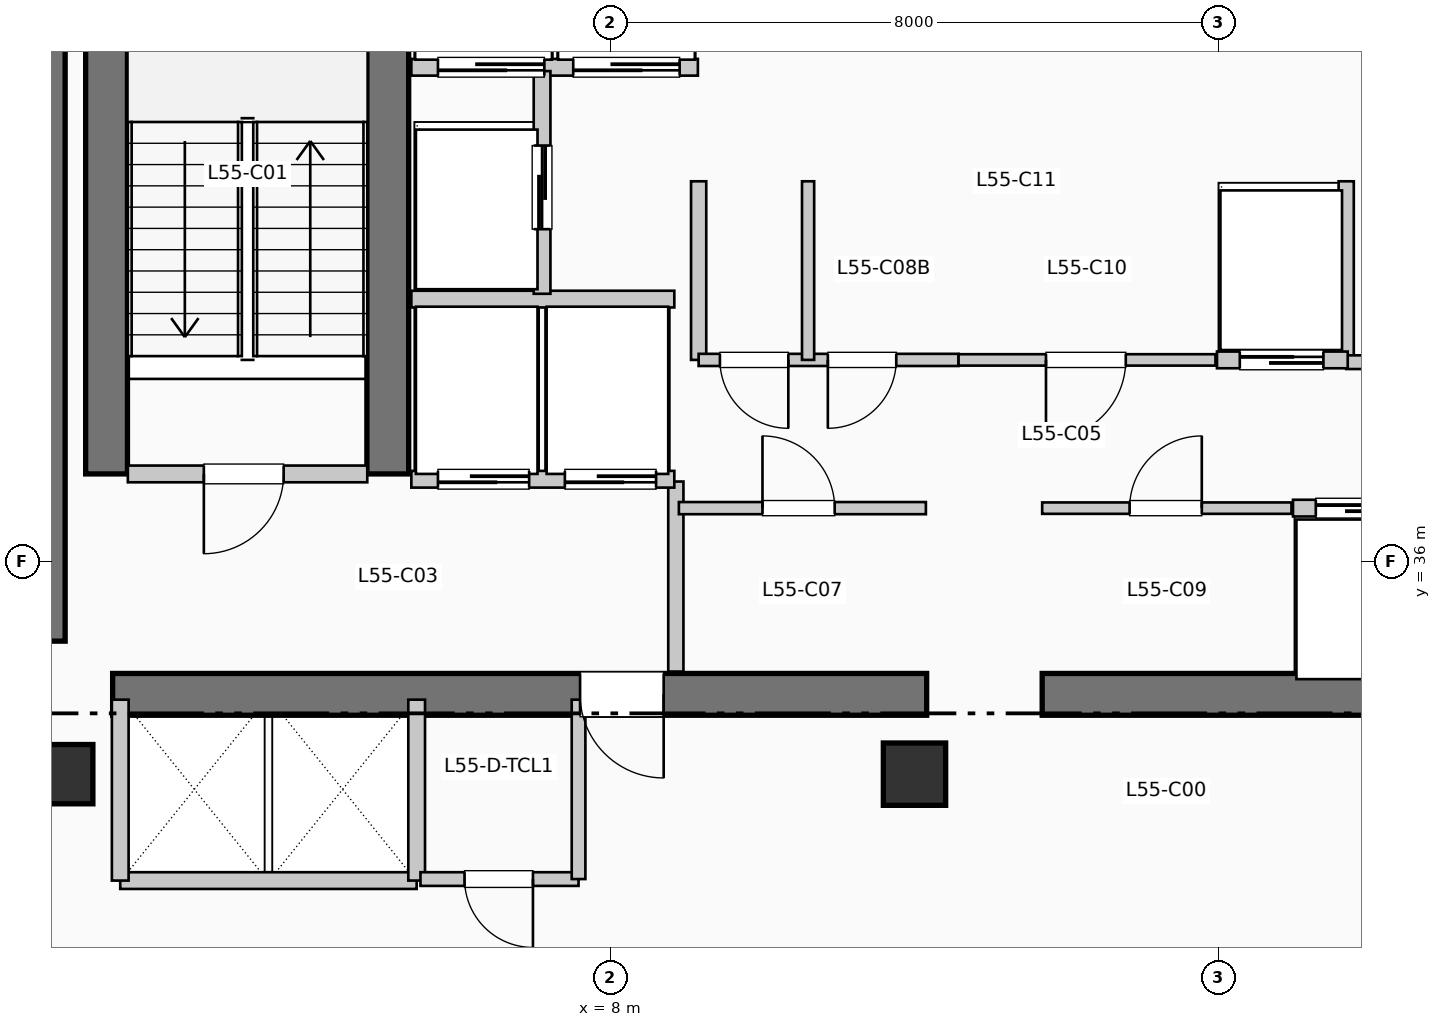
"""IFC4 building model, lengths in metres.
Left out: names, types, materials, properties, quantities, classifications, styles, units other than length and angle.
Written with IfcOpenShell. Run it as: python <this file> out.ifc"""

import sys

from ifc_helpers import new_model, si_unit, direction, frame, frame_2d, origin, origin_2d, place, context, subcontext, project, spatial, rectangle, extrude, element, fill, save


model = new_model("IFC4")
c1 = context("Model", 3, precision=1e-05, world=origin(), true_north=direction((0.0, 1.0)))
c2 = subcontext(c1, "Body", "Model", "MODEL_VIEW")
j1 = project(units=[si_unit("LENGTHUNIT", "METRE"), si_unit("PLANEANGLEUNIT", "RADIAN")], contexts=[c1])
p1 = place(None, origin())
s1 = spatial("IfcSite", under=j1, at=p1, CompositionType="ELEMENT")
p2 = place(p1, origin())
s2 = spatial("IfcBuilding", under=s1, at=p2, CompositionType="ELEMENT")
p3 = place(p2, frame((0.0, 0.0, 227.7)))
s3 = spatial("IfcBuildingStorey", under=s2, at=p3, CompositionType="ELEMENT", Elevation=227.7)
p4 = place(p3, frame((0.5, 34.95, 0.0), z_axis=(0.0, 0.0, 1.0), x_axis=(0.0, 1.0, 0.0)))
e1 = element("IfcWall", 1, at=p4, inside=s3, PredefinedType="SHEAR", context=c2, shape_type="SweptSolid", body=[
    extrude(rectangle(XDim=7.9, YDim=0.65, at=frame_2d((3.95, 0.0))), origin(), (0.0, 0.0, 1.0), 3.96),
])
p5 = place(p3, frame((1.45, 34.25, 0.0), z_axis=(0.0, 0.0, 1.0), x_axis=(1.0, 0.0, 0.0)))
e2 = element("IfcWall", 2, at=p5, inside=s3, PredefinedType="SHEAR", context=c2, shape_type="SweptSolid", body=[
    extrude(rectangle(XDim=10.71, YDim=0.55, at=frame_2d((5.355, 0.0))), origin(), (0.0, 0.0, 1.0), 3.96),
])
p6 = place(p5, frame((7.25, 0.0, 0.0), z_axis=(0.0, 0.0, 1.0), x_axis=(-1.0, 0.0, 0.0)))
e3 = element("IfcOpeningElement", 3, at=p6, cuts=e2, PredefinedType="OPENING", context=c2, shape_type="SweptSolid", body=[
    extrude(rectangle(XDim=1.1, YDim=2.15, at=frame_2d((0.55, 1.075))), frame((0.0, 0.285, 0.0), z_axis=(0.0, -1.0, 0.0), x_axis=(1.0, 0.0, 0.0)), (0.0, 0.0, 1.0), 0.57),
])
p7 = place(p3, frame((13.68, 34.25, 0.0), z_axis=(0.0, 0.0, 1.0), x_axis=(1.0, 0.0, 0.0)))
e4 = element("IfcWall", 4, at=p7, inside=s3, PredefinedType="SHEAR", context=c2, shape_type="SweptSolid", body=[
    extrude(rectangle(XDim=6.12, YDim=0.55, at=frame_2d((3.06, 0.0))), origin(), (0.0, 0.0, 1.0), 3.96),
])
for number, where, z_axis, x_axis in (
    (5, (1.37, 37.15, 0.0), (0.0, 0.0, 1.0), (0.0, 1.0, 0.0)),
    (6, (5.07, 37.15, 0.0), (0.0, 0.0, 1.0), (0.0, 1.0, 0.0)),
):
    element("IfcWall", number, at=place(p3, frame(where, z_axis=z_axis, x_axis=x_axis)), inside=s3, PredefinedType="SHEAR", context=c2, shape_type="SweptSolid", body=[
        extrude(rectangle(XDim=7.89, YDim=0.55, at=frame_2d((3.945, 0.0))), origin(), (0.0, 0.0, 1.0), 3.96),
    ])
p8 = place(p3, frame((0.8, 33.2, 0.0), z_axis=(0.0, 0.0, 1.0), x_axis=(1.0, 0.0, 0.0)))
e7 = element("IfcColumn", 7, at=p8, inside=s3, PredefinedType="COLUMN", context=c2, shape_type="SweptSolid", body=[
    extrude(rectangle(XDim=0.78, YDim=0.78, at=origin_2d()), origin(), (0.0, 0.0, 1.0), 3.96),
])
p9 = place(p3, frame((12.0, 33.2, 0.0), z_axis=(0.0, 0.0, 1.0), x_axis=(1.0, 0.0, 0.0)))
e8 = element("IfcColumn", 8, at=p9, inside=s3, PredefinedType="COLUMN", context=c2, shape_type="SweptSolid", body=[
    extrude(rectangle(XDim=0.82, YDim=0.82, at=origin_2d()), origin(), (0.0, 0.0, 1.0), 3.96),
])
p10 = place(p3, frame((1.65, 37.15, 0.0), z_axis=(0.0, 0.0, 1.0), x_axis=(1.0, 0.0, 0.0)))
e9 = element("IfcWall", 9, at=p10, inside=s3, PredefinedType="PARTITIONING", context=c2, shape_type="SweptSolid", body=[
    extrude(rectangle(XDim=3.15, YDim=0.22, at=frame_2d((1.575, 0.0))), origin(), (0.0, 0.0, 1.0), 3.71),
])
p11 = place(p10, frame((2.05, 0.0, 0.0), z_axis=(0.0, 0.0, 1.0), x_axis=(-1.0, 0.0, 0.0)))
e10 = element("IfcOpeningElement", 10, at=p11, cuts=e9, PredefinedType="OPENING", context=c2, shape_type="SweptSolid", body=[
    extrude(rectangle(XDim=1.05, YDim=2.15, at=frame_2d((0.525, 1.075))), frame((0.0, 0.12, 0.0), z_axis=(0.0, -1.0, 0.0), x_axis=(1.0, 0.0, 0.0)), (0.0, 0.0, 1.0), 0.24),
])
p12 = place(p3, frame((8.86, 34.55, 0.0), z_axis=(0.0, 0.0, 1.0), x_axis=(0.0, 1.0, 0.0)))
e11 = element("IfcWall", 11, at=p12, inside=s3, PredefinedType="PARTITIONING", context=c2, shape_type="SweptSolid", body=[
    extrude(rectangle(XDim=2.5, YDim=0.2, at=frame_2d((1.25, 0.0))), origin(), (0.0, 0.0, 1.0), 3.71),
])
p13 = place(p3, frame((5.38, 37.08, 0.0), z_axis=(0.0, 0.0, 1.0), x_axis=(1.0, 0.0, 0.0)))
e12 = element("IfcWall", 12, at=p13, inside=s3, PredefinedType="PARTITIONING", context=c2, shape_type="SweptSolid", body=[
    extrude(rectangle(XDim=3.46, YDim=0.22, at=frame_2d((1.73, 0.0))), origin(), (0.0, 0.0, 1.0), 3.71),
])
p14 = place(p13, frame((1.55, 0.0, 0.0), z_axis=(0.0, 0.0, 1.0), x_axis=(-1.0, 0.0, 0.0)))
e13 = element("IfcOpeningElement", 13, at=p14, cuts=e12, PredefinedType="OPENING", context=c2, shape_type="SweptSolid", body=[
    extrude(rectangle(XDim=1.2, YDim=2.2, at=frame_2d((0.6, 1.1))), frame((0.0, 0.12, 0.0), z_axis=(0.0, -1.0, 0.0), x_axis=(1.0, 0.0, 0.0)), (0.0, 0.0, 1.0), 0.24),
])
p15 = place(p13, frame((3.22, 0.0, 0.0), z_axis=(0.0, 0.0, 1.0), x_axis=(-1.0, 0.0, 0.0)))
e14 = element("IfcOpeningElement", 14, at=p15, cuts=e12, PredefinedType="OPENING", context=c2, shape_type="SweptSolid", body=[
    extrude(rectangle(XDim=1.2, YDim=2.2, at=frame_2d((0.6, 1.1))), frame((0.0, 0.12, 0.0), z_axis=(0.0, -1.0, 0.0), x_axis=(1.0, 0.0, 0.0)), (0.0, 0.0, 1.0), 0.24),
])
p16 = place(p3, frame((5.38, 39.45, 0.0), z_axis=(0.0, 0.0, 1.0), x_axis=(1.0, 0.0, 0.0)))
e15 = element("IfcWall", 15, at=p16, inside=s3, PredefinedType="PARTITIONING", context=c2, shape_type="SweptSolid", body=[
    extrude(rectangle(XDim=3.46, YDim=0.22, at=frame_2d((1.73, 0.0))), origin(), (0.0, 0.0, 1.0), 3.71),
])
p17 = place(p3, frame((5.38, 42.5, 0.0), z_axis=(0.0, 0.0, 1.0), x_axis=(1.0, 0.0, 0.0)))
e16 = element("IfcWall", 16, at=p17, inside=s3, PredefinedType="PARTITIONING", context=c2, shape_type="SweptSolid", body=[
    extrude(rectangle(XDim=3.77, YDim=0.22, at=frame_2d((1.885, 0.0))), origin(), (0.0, 0.0, 1.0), 3.71),
])
p18 = place(p17, frame((1.75, 0.0, 0.0), z_axis=(0.0, 0.0, 1.0), x_axis=(-1.0, 0.0, 0.0)))
e17 = element("IfcOpeningElement", 17, at=p18, cuts=e16, PredefinedType="OPENING", context=c2, shape_type="SweptSolid", body=[
    extrude(rectangle(XDim=1.4, YDim=2.2, at=frame_2d((0.7, 1.1))), frame((0.0, 0.12, 0.0), z_axis=(0.0, -1.0, 0.0), x_axis=(1.0, 0.0, 0.0)), (0.0, 0.0, 1.0), 0.24),
])
p19 = place(p17, frame((3.53, 0.0, 0.0), z_axis=(0.0, 0.0, 1.0), x_axis=(-1.0, 0.0, 0.0)))
e18 = element("IfcOpeningElement", 18, at=p19, cuts=e16, PredefinedType="OPENING", context=c2, shape_type="SweptSolid", body=[
    extrude(rectangle(XDim=1.4, YDim=2.2, at=frame_2d((0.7, 1.1))), frame((0.0, 0.12, 0.0), z_axis=(0.0, -1.0, 0.0), x_axis=(1.0, 0.0, 0.0)), (0.0, 0.0, 1.0), 0.24),
])
p20 = place(p3, frame((7.1, 39.52, 0.0), z_axis=(0.0, 0.0, 1.0), x_axis=(0.0, 1.0, 0.0)))
e19 = element("IfcWall", 19, at=p20, inside=s3, PredefinedType="PARTITIONING", context=c2, shape_type="SweptSolid", body=[
    extrude(rectangle(XDim=2.93, YDim=0.22, at=frame_2d((1.465, 0.0))), origin(), (0.0, 0.0, 1.0), 3.71),
])
p21 = place(p20, frame((0.85, 0.0, 0.0)))
e20 = element("IfcOpeningElement", 20, at=p21, cuts=e19, PredefinedType="OPENING", context=c2, shape_type="SweptSolid", body=[
    extrude(rectangle(XDim=1.1, YDim=2.2, at=frame_2d((0.55, 1.1))), frame((0.0, 0.12, 0.0), z_axis=(0.0, -1.0, 0.0), x_axis=(1.0, 0.0, 0.0)), (0.0, 0.0, 1.0), 0.24),
])
p22 = place(p3, frame((1.55, 31.8, 0.0), z_axis=(0.0, 0.0, 1.0), x_axis=(1.0, 0.0, 0.0)))
e21 = element("IfcWall", 21, at=p22, inside=s3, PredefinedType="PARTITIONING", context=c2, shape_type="SweptSolid", body=[
    extrude(rectangle(XDim=3.9, YDim=0.22, at=frame_2d((1.95, 0.0))), origin(), (0.0, 0.0, 1.0), 3.71),
])
for number, where, z_axis, x_axis in (
    (22, (1.55, 31.8, 0.0), (0.0, 0.0, 1.0), (0.0, 1.0, 0.0)),
    (23, (5.45, 31.8, 0.0), (0.0, 0.0, 1.0), (0.0, 1.0, 0.0)),
):
    element("IfcWall", number, at=place(p3, frame(where, z_axis=z_axis, x_axis=x_axis)), inside=s3, PredefinedType="PARTITIONING", context=c2, shape_type="SweptSolid", body=[
        extrude(rectangle(XDim=2.38, YDim=0.22, at=frame_2d((1.19, 0.0))), origin(), (0.0, 0.0, 1.0), 3.71),
    ])
for number, where, z_axis, x_axis in (
    (24, (9.16, 38.65, 0.0), (0.0, 0.0, 1.0), (0.0, 1.0, 0.0)),
    (25, (17.68, 38.65, 0.0), (0.0, 0.0, 1.0), (0.0, 1.0, 0.0)),
):
    element("IfcWall", number, at=place(p3, frame(where, z_axis=z_axis, x_axis=x_axis)), inside=s3, PredefinedType="PARTITIONING", context=c2, shape_type="SweptSolid", body=[
        extrude(rectangle(XDim=2.35, YDim=0.2, at=frame_2d((1.175, 0.0))), origin(), (0.0, 0.0, 1.0), 3.71),
    ])
p23 = place(p3, frame((17.68, 38.62, 0.0), z_axis=(0.0, 0.0, 1.0), x_axis=(1.0, 0.0, 0.0)))
e26 = element("IfcWall", 26, at=p23, inside=s3, PredefinedType="PARTITIONING", context=c2, shape_type="SweptSolid", body=[
    extrude(rectangle(XDim=1.84, YDim=0.18, at=frame_2d((0.92, 0.0))), origin(), (0.0, 0.0, 1.0), 3.71),
])
p24 = place(p23, frame((0.24, 0.0, 0.0)))
e27 = element("IfcOpeningElement", 27, at=p24, cuts=e26, PredefinedType="OPENING", context=c2, shape_type="SweptSolid", body=[
    extrude(rectangle(XDim=0.92, YDim=2.1, at=frame_2d((0.46, 1.05))), frame((0.0, 0.1, 0.0), z_axis=(0.0, -1.0, 0.0), x_axis=(1.0, 0.0, 0.0)), (0.0, 0.0, 1.0), 0.2),
])
p25 = place(p3, frame((5.5, 31.82, 0.0), z_axis=(0.0, 0.0, 1.0), x_axis=(1.0, 0.0, 0.0)))
e28 = element("IfcWall", 28, at=p25, inside=s3, PredefinedType="PLUMBINGWALL", context=c2, shape_type="SweptSolid", body=[
    extrude(rectangle(XDim=2.08, YDim=0.18, at=frame_2d((1.04, 0.0))), origin(), (0.0, 0.0, 1.0), 3.71),
])
p26 = place(p25, frame((1.48, 0.0, 0.0), z_axis=(0.0, 0.0, 1.0), x_axis=(-1.0, 0.0, 0.0)))
e29 = element("IfcOpeningElement", 29, at=p26, cuts=e28, PredefinedType="OPENING", context=c2, shape_type="SweptSolid", body=[
    extrude(rectangle(XDim=0.9, YDim=2.1, at=frame_2d((0.45, 1.05))), frame((0.0, 0.1, 0.0), z_axis=(0.0, -1.0, 0.0), x_axis=(1.0, 0.0, 0.0)), (0.0, 0.0, 1.0), 0.2),
])
p27 = place(p3, frame((7.58, 31.82, 0.0), z_axis=(0.0, 0.0, 1.0), x_axis=(0.0, 1.0, 0.0)))
e30 = element("IfcWall", 30, at=p27, inside=s3, PredefinedType="PLUMBINGWALL", context=c2, shape_type="SweptSolid", body=[
    extrude(rectangle(XDim=2.36, YDim=0.18, at=frame_2d((1.18, 0.0))), origin(), (0.0, 0.0, 1.0), 3.71),
])
p28 = place(p3, frame((8.9, 36.7, 0.0), z_axis=(0.0, 0.0, 1.0), x_axis=(1.0, 0.0, 0.0)))
e31 = element("IfcWall", 31, at=p28, inside=s3, PredefinedType="PARTITIONING", context=c2, shape_type="SweptSolid", body=[
    extrude(rectangle(XDim=3.25, YDim=0.16, at=frame_2d((1.625, 0.0))), origin(), (0.0, 0.0, 1.0), 3.71),
])
p29 = place(p28, frame((1.1, 0.0, 0.0)))
e32 = element("IfcOpeningElement", 32, at=p29, cuts=e31, PredefinedType="OPENING", context=c2, shape_type="SweptSolid", body=[
    extrude(rectangle(XDim=0.95, YDim=2.15, at=frame_2d((0.475, 1.075))), frame((0.0, 0.09, 0.0), z_axis=(0.0, -1.0, 0.0), x_axis=(1.0, 0.0, 0.0)), (0.0, 0.0, 1.0), 0.18),
])
p30 = place(p3, frame((9.16, 38.65, 0.0), z_axis=(0.0, 0.0, 1.0), x_axis=(1.0, 0.0, 0.0)))
e33 = element("IfcWall", 33, at=p30, inside=s3, PredefinedType="PARTITIONING", context=c2, shape_type="SweptSolid", body=[
    extrude(rectangle(XDim=3.42, YDim=0.16, at=frame_2d((1.71, 0.0))), origin(), (0.0, 0.0, 1.0), 3.71),
])
p31 = place(p30, frame((1.18, 0.0, 0.0), z_axis=(0.0, 0.0, 1.0), x_axis=(-1.0, 0.0, 0.0)))
e34 = element("IfcOpeningElement", 34, at=p31, cuts=e33, PredefinedType="OPENING", context=c2, shape_type="SweptSolid", body=[
    extrude(rectangle(XDim=0.9, YDim=2.15, at=frame_2d((0.45, 1.075))), frame((0.0, 0.09, 0.0), z_axis=(0.0, -1.0, 0.0), x_axis=(1.0, 0.0, 0.0)), (0.0, 0.0, 1.0), 0.18),
])
p32 = place(p30, frame((2.6, 0.0, 0.0), z_axis=(0.0, 0.0, 1.0), x_axis=(-1.0, 0.0, 0.0)))
e35 = element("IfcOpeningElement", 35, at=p32, cuts=e33, PredefinedType="OPENING", context=c2, shape_type="SweptSolid", body=[
    extrude(rectangle(XDim=0.9, YDim=2.15, at=frame_2d((0.45, 1.075))), frame((0.0, 0.09, 0.0), z_axis=(0.0, -1.0, 0.0), x_axis=(1.0, 0.0, 0.0)), (0.0, 0.0, 1.0), 0.18),
])
p33 = place(p3, frame((10.6, 38.65, 0.0), z_axis=(0.0, 0.0, 1.0), x_axis=(0.0, 1.0, 0.0)))
e36 = element("IfcWall", 36, at=p33, inside=s3, PredefinedType="PARTITIONING", context=c2, shape_type="SweptSolid", body=[
    extrude(rectangle(XDim=2.35, YDim=0.16, at=frame_2d((1.175, 0.0))), origin(), (0.0, 0.0, 1.0), 3.71),
])
p34 = place(p3, frame((13.68, 36.7, 0.0), z_axis=(0.0, 0.0, 1.0), x_axis=(1.0, 0.0, 0.0)))
e37 = element("IfcWall", 37, at=p34, inside=s3, PredefinedType="PARTITIONING", context=c2, shape_type="SweptSolid", body=[
    extrude(rectangle(XDim=3.28, YDim=0.15, at=frame_2d((1.64, 0.0))), origin(), (0.0, 0.0, 1.0), 3.71),
])
p35 = place(p34, frame((1.15, 0.0, 0.0)))
e38 = element("IfcOpeningElement", 38, at=p35, cuts=e37, PredefinedType="OPENING", context=c2, shape_type="SweptSolid", body=[
    extrude(rectangle(XDim=0.95, YDim=2.15, at=frame_2d((0.475, 1.075))), frame((0.0, 0.085, 0.0), z_axis=(0.0, -1.0, 0.0), x_axis=(1.0, 0.0, 0.0)), (0.0, 0.0, 1.0), 0.17),
])
p36 = place(p3, frame((12.58, 38.65, 0.0), z_axis=(0.0, 0.0, 1.0), x_axis=(1.0, 0.0, 0.0)))
e39 = element("IfcWall", 39, at=p36, inside=s3, PredefinedType="PARTITIONING", context=c2, shape_type="SweptSolid", body=[
    extrude(rectangle(XDim=3.38, YDim=0.15, at=frame_2d((1.69, 0.0))), origin(), (0.0, 0.0, 1.0), 3.71),
])
p37 = place(p36, frame((2.2, 0.0, 0.0), z_axis=(0.0, 0.0, 1.0), x_axis=(-1.0, 0.0, 0.0)))
e40 = element("IfcOpeningElement", 40, at=p37, cuts=e39, PredefinedType="OPENING", context=c2, shape_type="SweptSolid", body=[
    extrude(rectangle(XDim=1.05, YDim=2.15, at=frame_2d((0.525, 1.075))), frame((0.0, 0.085, 0.0), z_axis=(0.0, -1.0, 0.0), x_axis=(1.0, 0.0, 0.0)), (0.0, 0.0, 1.0), 0.17),
])
p38 = place(p3, frame((16.98, 36.7, 0.0), z_axis=(0.0, 0.0, 1.0), x_axis=(1.0, 0.0, 0.0)))
e41 = element("IfcWall", 41, at=p38, inside=s3, PredefinedType="PARTITIONING", context=c2, shape_type="SweptSolid", body=[
    extrude(rectangle(XDim=1.7, YDim=0.22, at=frame_2d((0.85, 0.0))), origin(), (0.0, 0.0, 1.0), 3.71),
])
p39 = place(p38, frame((0.3, 0.0, 0.0)))
e42 = element("IfcOpeningElement", 42, at=p39, cuts=e41, PredefinedType="OPENING", context=c2, shape_type="SweptSolid", body=[
    extrude(rectangle(XDim=1.1, YDim=2.2, at=frame_2d((0.55, 1.1))), frame((0.0, 0.12, 0.0), z_axis=(0.0, -1.0, 0.0), x_axis=(1.0, 0.0, 0.0)), (0.0, 0.0, 1.0), 0.24),
])
p40 = place(p3, frame((15.98, 38.65, 0.0), z_axis=(0.0, 0.0, 1.0), x_axis=(1.0, 0.0, 0.0)))
e43 = element("IfcWall", 43, at=p40, inside=s3, PredefinedType="PARTITIONING", context=c2, shape_type="SweptSolid", body=[
    extrude(rectangle(XDim=1.72, YDim=0.22, at=frame_2d((0.86, 0.0))), origin(), (0.0, 0.0, 1.0), 3.71),
])
p41 = place(p40, frame((0.3, 0.0, 0.0)))
e44 = element("IfcOpeningElement", 44, at=p41, cuts=e43, PredefinedType="OPENING", context=c2, shape_type="SweptSolid", body=[
    extrude(rectangle(XDim=1.1, YDim=2.2, at=frame_2d((0.55, 1.1))), frame((0.0, 0.12, 0.0), z_axis=(0.0, -1.0, 0.0), x_axis=(1.0, 0.0, 0.0)), (0.0, 0.0, 1.0), 0.24),
])
p42 = place(p11, origin())
e45 = element("IfcDoor", 45, at=p42, inside=s3, OperationType="SINGLE_SWING_LEFT", PredefinedType="DOOR", context=c2, shape_type="SweptSolid", body=[
    extrude(rectangle(XDim=1.05, YDim=2.15, at=frame_2d((0.525, 1.075))), frame((0.0, 0.025, 0.0), z_axis=(0.0, -1.0, 0.0), x_axis=(1.0, 0.0, 0.0)), (0.0, 0.0, 1.0), 0.05),
])
fill(e10, e45)
p43 = place(p6, origin())
e46 = element("IfcDoor", 46, at=p43, inside=s3, OperationType="SINGLE_SWING_RIGHT", PredefinedType="DOOR", context=c2, shape_type="SweptSolid", body=[
    extrude(rectangle(XDim=1.1, YDim=2.15, at=frame_2d((0.55, 1.075))), frame((0.0, 0.025, 0.0), z_axis=(0.0, -1.0, 0.0), x_axis=(1.0, 0.0, 0.0)), (0.0, 0.0, 1.0), 0.05),
])
fill(e3, e46)
p44 = place(p14, origin())
e47 = element("IfcDoor", 47, at=p44, inside=s3, OperationType="SLIDING_TO_RIGHT", PredefinedType="DOOR", context=c2, shape_type="SweptSolid", body=[
    extrude(rectangle(XDim=1.2, YDim=2.2, at=frame_2d((0.6, 1.1))), frame((0.0, 0.025, 0.0), z_axis=(0.0, -1.0, 0.0), x_axis=(1.0, 0.0, 0.0)), (0.0, 0.0, 1.0), 0.05),
])
fill(e13, e47)
p45 = place(p15, origin())
e48 = element("IfcDoor", 48, at=p45, inside=s3, OperationType="SLIDING_TO_RIGHT", PredefinedType="DOOR", context=c2, shape_type="SweptSolid", body=[
    extrude(rectangle(XDim=1.2, YDim=2.2, at=frame_2d((0.6, 1.1))), frame((0.0, 0.025, 0.0), z_axis=(0.0, -1.0, 0.0), x_axis=(1.0, 0.0, 0.0)), (0.0, 0.0, 1.0), 0.05),
])
fill(e14, e48)
p46 = place(p18, origin())
e49 = element("IfcDoor", 49, at=p46, inside=s3, OperationType="SLIDING_TO_LEFT", PredefinedType="DOOR", context=c2, shape_type="SweptSolid", body=[
    extrude(rectangle(XDim=1.4, YDim=2.2, at=frame_2d((0.7, 1.1))), frame((0.0, 0.025, 0.0), z_axis=(0.0, -1.0, 0.0), x_axis=(1.0, 0.0, 0.0)), (0.0, 0.0, 1.0), 0.05),
])
fill(e17, e49)
p47 = place(p19, origin())
e50 = element("IfcDoor", 50, at=p47, inside=s3, OperationType="SLIDING_TO_LEFT", PredefinedType="DOOR", context=c2, shape_type="SweptSolid", body=[
    extrude(rectangle(XDim=1.4, YDim=2.2, at=frame_2d((0.7, 1.1))), frame((0.0, 0.025, 0.0), z_axis=(0.0, -1.0, 0.0), x_axis=(1.0, 0.0, 0.0)), (0.0, 0.0, 1.0), 0.05),
])
fill(e18, e50)
p48 = place(p21, origin())
e51 = element("IfcDoor", 51, at=p48, inside=s3, OperationType="SLIDING_TO_LEFT", PredefinedType="DOOR", context=c2, shape_type="SweptSolid", body=[
    extrude(rectangle(XDim=1.1, YDim=2.2, at=frame_2d((0.55, 1.1))), frame((0.0, 0.025, 0.0), z_axis=(0.0, -1.0, 0.0), x_axis=(1.0, 0.0, 0.0)), (0.0, 0.0, 1.0), 0.05),
])
fill(e20, e51)
p49 = place(p26, origin())
e52 = element("IfcDoor", 52, at=p49, inside=s3, OperationType="SINGLE_SWING_RIGHT", PredefinedType="DOOR", context=c2, shape_type="SweptSolid", body=[
    extrude(rectangle(XDim=0.9, YDim=2.1, at=frame_2d((0.45, 1.05))), frame((0.0, 0.025, 0.0), z_axis=(0.0, -1.0, 0.0), x_axis=(1.0, 0.0, 0.0)), (0.0, 0.0, 1.0), 0.05),
])
fill(e29, e52)
p50 = place(p29, origin())
e53 = element("IfcDoor", 53, at=p50, inside=s3, OperationType="SINGLE_SWING_LEFT", PredefinedType="DOOR", context=c2, shape_type="SweptSolid", body=[
    extrude(rectangle(XDim=0.95, YDim=2.15, at=frame_2d((0.475, 1.075))), frame((0.0, 0.025, 0.0), z_axis=(0.0, -1.0, 0.0), x_axis=(1.0, 0.0, 0.0)), (0.0, 0.0, 1.0), 0.05),
])
fill(e32, e53)
p51 = place(p31, origin())
e54 = element("IfcDoor", 54, at=p51, inside=s3, OperationType="SINGLE_SWING_RIGHT", PredefinedType="DOOR", context=c2, shape_type="SweptSolid", body=[
    extrude(rectangle(XDim=0.9, YDim=2.15, at=frame_2d((0.45, 1.075))), frame((0.0, 0.025, 0.0), z_axis=(0.0, -1.0, 0.0), x_axis=(1.0, 0.0, 0.0)), (0.0, 0.0, 1.0), 0.05),
])
fill(e34, e54)
p52 = place(p32, origin())
e55 = element("IfcDoor", 55, at=p52, inside=s3, OperationType="SINGLE_SWING_LEFT", PredefinedType="DOOR", context=c2, shape_type="SweptSolid", body=[
    extrude(rectangle(XDim=0.9, YDim=2.15, at=frame_2d((0.45, 1.075))), frame((0.0, 0.025, 0.0), z_axis=(0.0, -1.0, 0.0), x_axis=(1.0, 0.0, 0.0)), (0.0, 0.0, 1.0), 0.05),
])
fill(e35, e55)
p53 = place(p35, origin())
e56 = element("IfcDoor", 56, at=p53, inside=s3, OperationType="SINGLE_SWING_RIGHT", PredefinedType="DOOR", context=c2, shape_type="SweptSolid", body=[
    extrude(rectangle(XDim=0.95, YDim=2.15, at=frame_2d((0.475, 1.075))), frame((0.0, 0.025, 0.0), z_axis=(0.0, -1.0, 0.0), x_axis=(1.0, 0.0, 0.0)), (0.0, 0.0, 1.0), 0.05),
])
fill(e38, e56)
p54 = place(p37, origin())
e57 = element("IfcDoor", 57, at=p54, inside=s3, OperationType="SINGLE_SWING_LEFT", PredefinedType="DOOR", context=c2, shape_type="SweptSolid", body=[
    extrude(rectangle(XDim=1.05, YDim=2.15, at=frame_2d((0.525, 1.075))), frame((0.0, 0.025, 0.0), z_axis=(0.0, -1.0, 0.0), x_axis=(1.0, 0.0, 0.0)), (0.0, 0.0, 1.0), 0.05),
])
fill(e40, e57)
p55 = place(p39, origin())
e58 = element("IfcDoor", 58, at=p55, inside=s3, OperationType="SLIDING_TO_LEFT", PredefinedType="DOOR", context=c2, shape_type="SweptSolid", body=[
    extrude(rectangle(XDim=1.1, YDim=2.2, at=frame_2d((0.55, 1.1))), frame((0.0, 0.025, 0.0), z_axis=(0.0, -1.0, 0.0), x_axis=(1.0, 0.0, 0.0)), (0.0, 0.0, 1.0), 0.05),
])
fill(e42, e58)
p56 = place(p41, origin())
e59 = element("IfcDoor", 59, at=p56, inside=s3, OperationType="SLIDING_TO_LEFT", PredefinedType="DOOR", context=c2, shape_type="SweptSolid", body=[
    extrude(rectangle(XDim=1.1, YDim=2.2, at=frame_2d((0.55, 1.1))), frame((0.0, 0.025, 0.0), z_axis=(0.0, -1.0, 0.0), x_axis=(1.0, 0.0, 0.0)), (0.0, 0.0, 1.0), 0.05),
])
fill(e44, e59)
save(model, sys.argv[1])
